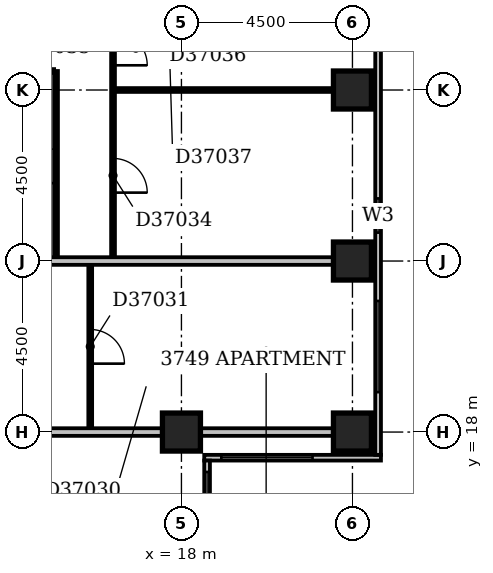
"""IFC4 building model, lengths in metres.
Left out: names, types, materials, properties, quantities, classifications, styles, units other than length and angle.
Written with IfcOpenShell. Run it as: python <this file> out.ifc"""

import sys

from ifc_helpers import new_model, si_unit, direction, frame, frame_2d, origin, origin_2d, place, context, subcontext, project, spatial, rectangle, extrude, element, fill, save


model = new_model("IFC4")
c1 = context("Model", 3, precision=1e-05, world=origin(), true_north=direction((0.0, 1.0)))
c2 = subcontext(c1, "Body", "Model", "MODEL_VIEW")
j1 = project(units=[si_unit("LENGTHUNIT", "METRE"), si_unit("PLANEANGLEUNIT", "RADIAN")], contexts=[c1])
p1 = place(None, origin())
s1 = spatial("IfcSite", under=j1, at=p1, CompositionType="ELEMENT")
p2 = place(p1, origin())
s2 = spatial("IfcBuilding", under=s1, at=p2, CompositionType="ELEMENT")
p3 = place(p2, frame((0.0, 0.0, 148.4)))
s3 = spatial("IfcBuildingStorey", under=s2, at=p3, CompositionType="ELEMENT", Elevation=148.4)
for number, where, z_axis, x_axis in (
    (1, (18.0, 18.0, -0.3), (0.0, 0.0, 1.0), (1.0, 0.0, 0.0)),
    (2, (22.5, 18.0, -0.3), (0.0, 0.0, 1.0), (1.0, 0.0, 0.0)),
    (3, (22.5, 22.5, -0.3), (0.0, 0.0, 1.0), (1.0, 0.0, 0.0)),
    (4, (22.5, 27.0, -0.3), (0.0, 0.0, 1.0), (1.0, 0.0, 0.0)),
):
    element("IfcColumn", number, at=place(p3, frame(where, z_axis=z_axis, x_axis=x_axis)), inside=s3, PredefinedType="COLUMN", context=c2, shape_type="SweptSolid", body=[
        extrude(rectangle(XDim=1.0, YDim=1.0, at=origin_2d()), origin(), (0.0, 0.0, 1.0), 3.6),
    ])
p4 = place(p3, frame((18.675, 8.4, 0.0), z_axis=(0.0, 0.0, 1.0), x_axis=(0.0, 1.0, 0.0)))
e5 = element("IfcWall", 5, at=p4, inside=s3, PredefinedType="STANDARD", context=c2, shape_type="SweptSolid", body=[
    extrude(rectangle(XDim=8.85, YDim=0.15, at=frame_2d((4.425, 0.0))), origin(), (0.0, 0.0, 1.0), 2.7),
])
p5 = place(p4, frame((1.434, 0.0, 0.6)))
e6 = element("IfcOpeningElement", 6, at=p5, cuts=e5, PredefinedType="OPENING", context=c2, shape_type="SweptSolid", body=[
    extrude(rectangle(XDim=1.8, YDim=1.8, at=frame_2d((0.9, 0.9))), frame((0.0, 0.087, 0.0), z_axis=(0.0, -1.0, 0.0), x_axis=(1.0, 0.0, 0.0)), (0.0, 0.0, 1.0), 0.174),
])
p6 = place(p4, frame((6.15, 0.0, 0.6)))
e7 = element("IfcOpeningElement", 7, at=p6, cuts=e5, PredefinedType="OPENING", context=c2, shape_type="SweptSolid", body=[
    extrude(rectangle(XDim=2.4, YDim=1.8, at=frame_2d((1.2, 0.9))), frame((0.0, 0.087, 0.0), z_axis=(0.0, -1.0, 0.0), x_axis=(1.0, 0.0, 0.0)), (0.0, 0.0, 1.0), 0.174),
])
p7 = place(p3, frame((18.6, 17.325, 0.0), z_axis=(0.0, 0.0, 1.0), x_axis=(1.0, 0.0, 0.0)))
e8 = element("IfcWall", 8, at=p7, inside=s3, PredefinedType="STANDARD", context=c2, shape_type="SweptSolid", body=[
    extrude(rectangle(XDim=4.65, YDim=0.15, at=frame_2d((2.325, 0.0))), origin(), (0.0, 0.0, 1.0), 2.7),
])
p8 = place(p7, frame((0.45, 0.0, 0.6)))
e9 = element("IfcOpeningElement", 9, at=p8, cuts=e8, PredefinedType="OPENING", context=c2, shape_type="SweptSolid", body=[
    extrude(rectangle(XDim=2.4, YDim=1.8, at=frame_2d((1.2, 0.9))), frame((0.0, 0.087, 0.0), z_axis=(0.0, -1.0, 0.0), x_axis=(1.0, 0.0, 0.0)), (0.0, 0.0, 1.0), 0.174),
])
p9 = place(p3, frame((23.175, 17.4, 0.0), z_axis=(0.0, 0.0, 1.0), x_axis=(0.0, 1.0, 0.0)))
e10 = element("IfcWall", 10, at=p9, inside=s3, PredefinedType="STANDARD", context=c2, shape_type="SweptSolid", body=[
    extrude(rectangle(XDim=17.85, YDim=0.15, at=frame_2d((8.925, 0.0))), origin(), (0.0, 0.0, 1.0), 2.7),
])
p10 = place(p9, frame((1.65, 0.0, 0.6)))
e11 = element("IfcOpeningElement", 11, at=p10, cuts=e10, PredefinedType="OPENING", context=c2, shape_type="SweptSolid", body=[
    extrude(rectangle(XDim=2.4, YDim=1.8, at=frame_2d((1.2, 0.9))), frame((0.0, 0.087, 0.0), z_axis=(0.0, -1.0, 0.0), x_axis=(1.0, 0.0, 0.0)), (0.0, 0.0, 1.0), 0.174),
])
p11 = place(p9, frame((5.848, 0.0, 0.6)))
e12 = element("IfcOpeningElement", 12, at=p11, cuts=e10, PredefinedType="OPENING", context=c2, shape_type="SweptSolid", body=[
    extrude(rectangle(XDim=0.9, YDim=1.8, at=frame_2d((0.45, 0.9))), frame((0.0, 0.087, 0.0), z_axis=(0.0, -1.0, 0.0), x_axis=(1.0, 0.0, 0.0)), (0.0, 0.0, 1.0), 0.174),
])
p12 = place(p9, frame((10.65, 0.0, 0.6)))
e13 = element("IfcOpeningElement", 13, at=p12, cuts=e10, PredefinedType="OPENING", context=c2, shape_type="SweptSolid", body=[
    extrude(rectangle(XDim=2.4, YDim=1.8, at=frame_2d((1.2, 0.9))), frame((0.0, 0.087, 0.0), z_axis=(0.0, -1.0, 0.0), x_axis=(1.0, 0.0, 0.0)), (0.0, 0.0, 1.0), 0.174),
])
p13 = place(p9, frame((15.15, 0.0, 0.6)))
e14 = element("IfcOpeningElement", 14, at=p13, cuts=e10, PredefinedType="OPENING", context=c2, shape_type="SweptSolid", body=[
    extrude(rectangle(XDim=2.4, YDim=1.8, at=frame_2d((1.2, 0.9))), frame((0.0, 0.087, 0.0), z_axis=(0.0, -1.0, 0.0), x_axis=(1.0, 0.0, 0.0)), (0.0, 0.0, 1.0), 0.174),
])
p14 = place(p3, frame((9.1, 18.0, 0.0), z_axis=(0.0, 0.0, 1.0), x_axis=(1.0, 0.0, 0.0)))
e15 = element("IfcWall", 15, at=p14, inside=s3, PredefinedType="PARTITIONING", context=c2, shape_type="SweptSolid", body=[
    extrude(rectangle(XDim=8.4, YDim=0.2, at=frame_2d((4.2, 0.0))), origin(), (0.0, 0.0, 1.0), 2.6),
])
p15 = place(p3, frame((18.5, 18.0, 0.0), z_axis=(0.0, 0.0, 1.0), x_axis=(1.0, 0.0, 0.0)))
e16 = element("IfcWall", 16, at=p15, inside=s3, PredefinedType="PARTITIONING", context=c2, shape_type="SweptSolid", body=[
    extrude(rectangle(XDim=3.5, YDim=0.2, at=frame_2d((1.75, 0.0))), origin(), (0.0, 0.0, 1.0), 2.7),
])
p16 = place(p3, frame((15.6, 18.1, 0.0), z_axis=(0.0, 0.0, 1.0), x_axis=(0.0, 1.0, 0.0)))
e17 = element("IfcWall", 17, at=p16, inside=s3, PredefinedType="PARTITIONING", context=c2, shape_type="SweptSolid", body=[
    extrude(rectangle(XDim=4.3, YDim=0.1, at=frame_2d((2.15, 0.0))), origin(), (0.0, 0.0, 1.0), 3.3),
])
p17 = place(p16, frame((1.7, 0.0, 0.0)))
e18 = element("IfcOpeningElement", 18, at=p17, cuts=e17, PredefinedType="OPENING", context=c2, shape_type="SweptSolid", body=[
    extrude(rectangle(XDim=0.9, YDim=2.1, at=frame_2d((0.45, 1.05))), frame((0.0, 0.062, 0.0), z_axis=(0.0, -1.0, 0.0), x_axis=(1.0, 0.0, 0.0)), (0.0, 0.0, 1.0), 0.124),
])
p18 = place(p3, frame((9.1, 22.5, 0.0), z_axis=(0.0, 0.0, 1.0), x_axis=(1.0, 0.0, 0.0)))
e19 = element("IfcWall", 19, at=p18, inside=s3, PredefinedType="PARTITIONING", context=c2, shape_type="SweptSolid", body=[
    extrude(rectangle(XDim=12.9, YDim=0.2, at=frame_2d((6.45, 0.0))), origin(), (0.0, 0.0, 1.0), 3.3),
])
p19 = place(p3, frame((14.7, 22.6, 0.0), z_axis=(0.0, 0.0, 1.0), x_axis=(0.0, 1.0, 0.0)))
e20 = element("IfcWall", 20, at=p19, inside=s3, PredefinedType="PARTITIONING", context=c2, shape_type="SweptSolid", body=[
    extrude(rectangle(XDim=4.9, YDim=0.1, at=frame_2d((2.45, 0.0))), origin(), (0.0, 0.0, 1.0), 3.3),
])
p20 = place(p19, frame((1.95, 0.0, 0.0)))
e21 = element("IfcOpeningElement", 21, at=p20, cuts=e20, PredefinedType="OPENING", context=c2, shape_type="SweptSolid", body=[
    extrude(rectangle(XDim=0.9, YDim=2.1, at=frame_2d((0.45, 1.05))), frame((0.0, 0.062, 0.0), z_axis=(0.0, -1.0, 0.0), x_axis=(1.0, 0.0, 0.0)), (0.0, 0.0, 1.0), 0.124),
])
p21 = place(p3, frame((16.2, 22.6, 0.0), z_axis=(0.0, 0.0, 1.0), x_axis=(0.0, 1.0, 0.0)))
e22 = element("IfcWall", 22, at=p21, inside=s3, PredefinedType="PARTITIONING", context=c2, shape_type="SweptSolid", body=[
    extrude(rectangle(XDim=8.8, YDim=0.1, at=frame_2d((4.4, 0.0))), origin(), (0.0, 0.0, 1.0), 3.3),
])
p22 = place(p21, frame((1.7, 0.0, 0.0)))
e23 = element("IfcOpeningElement", 23, at=p22, cuts=e22, PredefinedType="OPENING", context=c2, shape_type="SweptSolid", body=[
    extrude(rectangle(XDim=0.9, YDim=2.1, at=frame_2d((0.45, 1.05))), frame((0.0, 0.062, 0.0), z_axis=(0.0, -1.0, 0.0), x_axis=(1.0, 0.0, 0.0)), (0.0, 0.0, 1.0), 0.124),
])
p23 = place(p21, frame((5.05, 0.0, 0.0)))
e24 = element("IfcOpeningElement", 24, at=p23, cuts=e22, PredefinedType="OPENING", context=c2, shape_type="SweptSolid", body=[
    extrude(rectangle(XDim=0.9, YDim=2.1, at=frame_2d((0.45, 1.05))), frame((0.0, 0.062, 0.0), z_axis=(0.0, -1.0, 0.0), x_axis=(1.0, 0.0, 0.0)), (0.0, 0.0, 1.0), 0.124),
])
p24 = place(p3, frame((16.25, 27.0, 0.0), z_axis=(0.0, 0.0, 1.0), x_axis=(1.0, 0.0, 0.0)))
e25 = element("IfcWall", 25, at=p24, inside=s3, PredefinedType="PARTITIONING", context=c2, shape_type="SweptSolid", body=[
    extrude(rectangle(XDim=5.75, YDim=0.1, at=frame_2d((2.875, 0.0))), origin(), (0.0, 0.0, 1.0), 2.7),
])
p25 = place(p3, frame((9.1, 27.5, 0.0), z_axis=(0.0, 0.0, 1.0), x_axis=(1.0, 0.0, 0.0)))
e26 = element("IfcWall", 26, at=p25, inside=s3, PredefinedType="PARTITIONING", context=c2, shape_type="SweptSolid", body=[
    extrude(rectangle(XDim=5.55, YDim=0.1, at=frame_2d((2.775, 0.0))), origin(), (0.0, 0.0, 1.0), 2.7),
])
p26 = place(p6, origin())
e27 = element("IfcWindow", 27, at=p26, inside=s3, PartitioningType="SINGLE_PANEL", PredefinedType="WINDOW", context=c2, shape_type="SweptSolid", body=[
    extrude(rectangle(XDim=2.4, YDim=1.8, at=frame_2d((1.2, 0.9))), frame((0.0, 0.03, 0.0), z_axis=(0.0, -1.0, 0.0), x_axis=(1.0, 0.0, 0.0)), (0.0, 0.0, 1.0), 0.06),
])
fill(e7, e27)
p27 = place(p8, origin())
e28 = element("IfcWindow", 28, at=p27, inside=s3, PartitioningType="SINGLE_PANEL", PredefinedType="WINDOW", context=c2, shape_type="SweptSolid", body=[
    extrude(rectangle(XDim=2.4, YDim=1.8, at=frame_2d((1.2, 0.9))), frame((0.0, 0.03, 0.0), z_axis=(0.0, -1.0, 0.0), x_axis=(1.0, 0.0, 0.0)), (0.0, 0.0, 1.0), 0.06),
])
fill(e9, e28)
p28 = place(p10, origin())
e29 = element("IfcWindow", 29, at=p28, inside=s3, PartitioningType="SINGLE_PANEL", PredefinedType="WINDOW", context=c2, shape_type="SweptSolid", body=[
    extrude(rectangle(XDim=2.4, YDim=1.8, at=frame_2d((1.2, 0.9))), frame((0.0, 0.03, 0.0), z_axis=(0.0, -1.0, 0.0), x_axis=(1.0, 0.0, 0.0)), (0.0, 0.0, 1.0), 0.06),
])
fill(e11, e29)
p29 = place(p11, origin())
e30 = element("IfcWindow", 30, at=p29, inside=s3, PartitioningType="SINGLE_PANEL", PredefinedType="WINDOW", context=c2, shape_type="SweptSolid", body=[
    extrude(rectangle(XDim=0.9, YDim=1.8, at=frame_2d((0.45, 0.9))), frame((0.0, 0.03, 0.0), z_axis=(0.0, -1.0, 0.0), x_axis=(1.0, 0.0, 0.0)), (0.0, 0.0, 1.0), 0.06),
])
fill(e12, e30)
p30 = place(p17, frame((0.9, 0.0, 0.0), z_axis=(0.0, 0.0, 1.0), x_axis=(-1.0, 0.0, 0.0)))
e31 = element("IfcDoor", 31, at=p30, inside=s3, OperationType="SINGLE_SWING_RIGHT", PredefinedType="DOOR", context=c2, shape_type="SweptSolid", body=[
    extrude(rectangle(XDim=0.9, YDim=2.1, at=frame_2d((0.45, 1.05))), frame((0.0, 0.025, 0.0), z_axis=(0.0, -1.0, 0.0), x_axis=(1.0, 0.0, 0.0)), (0.0, 0.0, 1.0), 0.05),
])
fill(e18, e31)
p31 = place(p20, origin())
e32 = element("IfcDoor", 32, at=p31, inside=s3, OperationType="SINGLE_SWING_LEFT", PredefinedType="DOOR", context=c2, shape_type="SweptSolid", body=[
    extrude(rectangle(XDim=0.9, YDim=2.1, at=frame_2d((0.45, 1.05))), frame((0.0, 0.025, 0.0), z_axis=(0.0, -1.0, 0.0), x_axis=(1.0, 0.0, 0.0)), (0.0, 0.0, 1.0), 0.05),
])
fill(e21, e32)
p32 = place(p22, frame((0.9, 0.0, 0.0), z_axis=(0.0, 0.0, 1.0), x_axis=(-1.0, 0.0, 0.0)))
e33 = element("IfcDoor", 33, at=p32, inside=s3, OperationType="SINGLE_SWING_RIGHT", PredefinedType="DOOR", context=c2, shape_type="SweptSolid", body=[
    extrude(rectangle(XDim=0.9, YDim=2.1, at=frame_2d((0.45, 1.05))), frame((0.0, 0.025, 0.0), z_axis=(0.0, -1.0, 0.0), x_axis=(1.0, 0.0, 0.0)), (0.0, 0.0, 1.0), 0.05),
])
fill(e23, e33)
p33 = place(p23, frame((0.9, 0.0, 0.0), z_axis=(0.0, 0.0, 1.0), x_axis=(-1.0, 0.0, 0.0)))
e34 = element("IfcDoor", 34, at=p33, inside=s3, OperationType="SINGLE_SWING_RIGHT", PredefinedType="DOOR", context=c2, shape_type="SweptSolid", body=[
    extrude(rectangle(XDim=0.9, YDim=2.1, at=frame_2d((0.45, 1.05))), frame((0.0, 0.025, 0.0), z_axis=(0.0, -1.0, 0.0), x_axis=(1.0, 0.0, 0.0)), (0.0, 0.0, 1.0), 0.05),
])
fill(e24, e34)
save(model, sys.argv[1])
